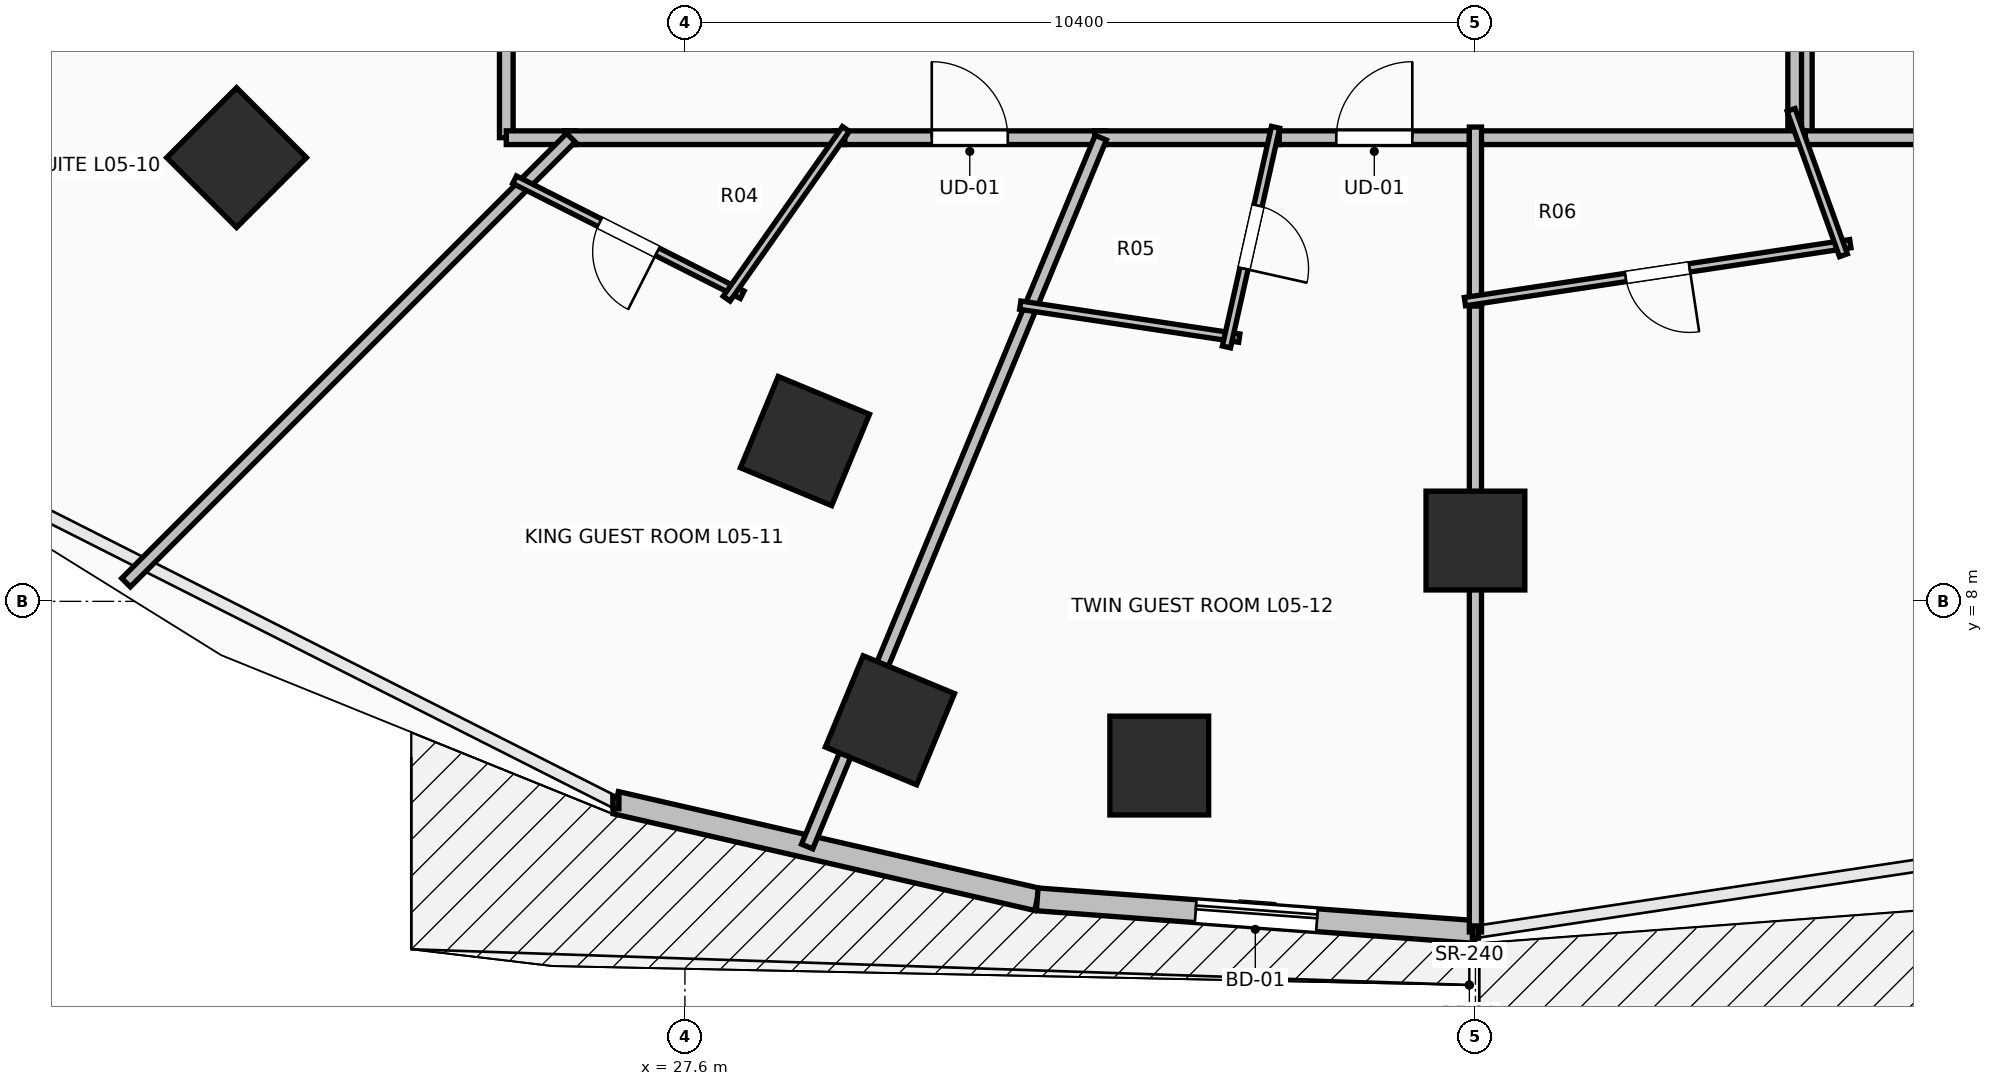
"""IFC4 building model, lengths in metres.
Left out: names, types, materials, properties, quantities, classifications, styles, units other than length and angle.
Written with IfcOpenShell. Run it as: python <this file> out.ifc"""

import sys

from ifc_helpers import new_model, si_unit, direction, frame, frame_2d, origin, origin_2d, place, context, subcontext, project, spatial, rectangle, extrude, element, fill, save


model = new_model("IFC4")
c1 = context("Model", 3, precision=1e-05, world=origin(), true_north=direction((0.0, 1.0)))
c2 = subcontext(c1, "Body", "Model", "MODEL_VIEW")
j1 = project(units=[si_unit("LENGTHUNIT", "METRE"), si_unit("PLANEANGLEUNIT", "RADIAN")], contexts=[c1])
p1 = place(None, origin())
s1 = spatial("IfcSite", under=j1, at=p1, CompositionType="ELEMENT")
p2 = place(p1, origin())
s2 = spatial("IfcBuilding", under=s1, at=p2, CompositionType="ELEMENT")
p3 = place(p2, frame((0.0, 0.0, 24.0)))
s3 = spatial("IfcBuildingStorey", under=s2, at=p3, CompositionType="ELEMENT", Elevation=24.0)
for number, where, z_axis, x_axis in (
    (1, (21.701, 13.838, 0.0), (0.0, 0.0, 1.0), (-0.707, -0.707, 0.0)),
    (2, (29.179, 10.109, 0.0), (0.0, 0.0, 1.0), (-0.383, -0.924, 0.0)),
    (3, (38.0, 8.8, 0.0), (0.0, 0.0, 1.0), (0.0, -1.0, 0.0)),
    (4, (30.297, 6.435, 0.0), (0.0, 0.0, 1.0), (-0.383, -0.924, 0.0)),
    (5, (33.84, 5.84, 0.0), (0.0, 0.0, 1.0), (0.0, -1.0, 0.0)),
):
    element("IfcColumn", number, at=place(p3, frame(where, z_axis=z_axis, x_axis=x_axis)), inside=s3, PredefinedType="COLUMN", context=c2, shape_type="SweptSolid", body=[
        extrude(rectangle(XDim=1.3, YDim=1.3, at=origin_2d()), origin(), (0.0, 0.0, 1.0), 3.5),
    ])
p4 = place(p3, frame((26.692, 5.351, 0.0), z_axis=(0.0, 0.0, 1.0), x_axis=(0.974671141646, -0.223642942305, 0.0)))
e6 = element("IfcWall", 6, at=p4, inside=s3, PredefinedType="STANDARD", context=c2, shape_type="SweptSolid", body=[
    extrude(rectangle(XDim=5.688, YDim=0.3, at=frame_2d((2.844, 0.0))), origin(), (0.0, 0.0, 1.0), 3.24),
])
p5 = place(p3, frame((32.235, 4.079, 0.0), z_axis=(0.0, 0.0, 1.0), x_axis=(0.99723690101, -0.074287032943, 0.0)))
e7 = element("IfcWall", 7, at=p5, inside=s3, PredefinedType="STANDARD", context=c2, shape_type="SweptSolid", body=[
    extrude(rectangle(XDim=5.781, YDim=0.3, at=frame_2d((2.89, 0.0))), origin(), (0.0, 0.0, 1.0), 3.24),
])
p6 = place(p5, frame((2.09, 0.0, 0.0)))
e8 = element("IfcOpeningElement", 8, at=p6, cuts=e7, PredefinedType="OPENING", context=c2, shape_type="SweptSolid", body=[
    extrude(rectangle(XDim=1.6, YDim=2.3, at=frame_2d((0.8, 1.15))), frame((0.0, 0.165, 0.0), z_axis=(0.0, -1.0, 0.0), x_axis=(1.0, 0.0, 0.0)), (0.0, 0.0, 1.0), 0.33),
])
p7 = place(p3, frame((25.25, 17.969, 0.0), z_axis=(0.0, 0.0, 1.0), x_axis=(0.0, -1.0, 0.0)))
e9 = element("IfcWall", 9, at=p7, inside=s3, PredefinedType="PARTITIONING", context=c2, shape_type="SweptSolid", body=[
    extrude(rectangle(XDim=3.869, YDim=0.18, at=frame_2d((1.935, 0.0))), origin(), (0.0, 0.0, 1.0), 2.432),
])
p8 = place(p7, frame((1.409, 0.0, 0.0)))
e10 = element("IfcOpeningElement", 10, at=p8, cuts=e9, PredefinedType="OPENING", context=c2, shape_type="SweptSolid", body=[
    extrude(rectangle(XDim=1.05, YDim=2.2, at=frame_2d((0.525, 1.1))), frame((0.0, 0.105, 0.0), z_axis=(0.0, -1.0, 0.0), x_axis=(1.0, 0.0, 0.0)), (0.0, 0.0, 1.0), 0.21),
])
p9 = place(p3, frame((25.25, 14.1, 0.0), z_axis=(0.0, 0.0, 1.0), x_axis=(1.0, 0.0, 0.0)))
e11 = element("IfcWall", 11, at=p9, inside=s3, PredefinedType="PARTITIONING", context=c2, shape_type="SweptSolid", body=[
    extrude(rectangle(XDim=0.91, YDim=0.18, at=frame_2d((0.455, 0.0))), origin(), (0.0, 0.0, 1.0), 3.24),
])
p10 = place(p3, frame((29.564, 14.1, 0.0), z_axis=(0.0, 0.0, 1.0), x_axis=(1.0, 0.0, 0.0)))
e12 = element("IfcWall", 12, at=p10, inside=s3, PredefinedType="PARTITIONING", context=c2, shape_type="SweptSolid", body=[
    extrude(rectangle(XDim=3.567, YDim=0.18, at=frame_2d((1.784, 0.0))), origin(), (0.0, 0.0, 1.0), 3.24),
])
p11 = place(p10, frame((1.283, 0.0, 0.0)))
e13 = element("IfcOpeningElement", 13, at=p11, cuts=e12, PredefinedType="OPENING", context=c2, shape_type="SweptSolid", body=[
    extrude(rectangle(XDim=1.0, YDim=2.15, at=frame_2d((0.5, 1.075))), frame((0.0, 0.105, 0.0), z_axis=(0.0, -1.0, 0.0), x_axis=(1.0, 0.0, 0.0)), (0.0, 0.0, 1.0), 0.21),
])
p12 = place(p3, frame((26.02, 14.1, 0.0), z_axis=(0.0, 0.0, 1.0), x_axis=(1.0, 0.0, 0.0)))
e14 = element("IfcWall", 14, at=p12, inside=s3, PredefinedType="PARTITIONING", context=c2, shape_type="SweptSolid", body=[
    extrude(rectangle(XDim=3.684, YDim=0.18, at=frame_2d((1.842, 0.0))), origin(), (0.0, 0.0, 1.0), 2.432),
])
p13 = place(p3, frame((35.279, 14.1, 0.0), z_axis=(0.0, 0.0, 1.0), x_axis=(1.0, 0.0, 0.0)))
e15 = element("IfcWall", 15, at=p13, inside=s3, PredefinedType="PARTITIONING", context=c2, shape_type="SweptSolid", body=[
    extrude(rectangle(XDim=2.781, YDim=0.18, at=frame_2d((1.391, 0.0))), origin(), (0.0, 0.0, 1.0), 3.24),
])
p14 = place(p13, frame((0.89, 0.0, 0.0)))
e16 = element("IfcOpeningElement", 16, at=p14, cuts=e15, PredefinedType="OPENING", context=c2, shape_type="SweptSolid", body=[
    extrude(rectangle(XDim=1.0, YDim=2.15, at=frame_2d((0.5, 1.075))), frame((0.0, 0.105, 0.0), z_axis=(0.0, -1.0, 0.0), x_axis=(1.0, 0.0, 0.0)), (0.0, 0.0, 1.0), 0.21),
])
p15 = place(p3, frame((32.991, 14.1, 0.0), z_axis=(0.0, 0.0, 1.0), x_axis=(1.0, 0.0, 0.0)))
e17 = element("IfcWall", 17, at=p15, inside=s3, PredefinedType="PARTITIONING", context=c2, shape_type="SweptSolid", body=[
    extrude(rectangle(XDim=2.428, YDim=0.18, at=frame_2d((1.214, 0.0))), origin(), (0.0, 0.0, 1.0), 3.24),
])
p16 = place(p3, frame((42.34, 16.24, 0.0), z_axis=(0.0, 0.0, 1.0), x_axis=(0.0, -1.0, 0.0)))
e18 = element("IfcWall", 18, at=p16, inside=s3, PredefinedType="PARTITIONING", context=c2, shape_type="SweptSolid", body=[
    extrude(rectangle(XDim=2.14, YDim=0.18, at=frame_2d((1.07, 0.0))), origin(), (0.0, 0.0, 1.0), 3.24),
])
p17 = place(p3, frame((42.34, 14.1, 0.0), z_axis=(0.0, 0.0, 1.0), x_axis=(1.0, 0.0, 0.0)))
e19 = element("IfcWall", 19, at=p17, inside=s3, PredefinedType="PARTITIONING", context=c2, shape_type="SweptSolid", body=[
    extrude(rectangle(XDim=7.645, YDim=0.18, at=frame_2d((3.823, 0.0))), origin(), (0.0, 0.0, 1.0), 2.432),
])
p18 = place(p17, frame((3.298, 0.0, 0.0)))
e20 = element("IfcOpeningElement", 20, at=p18, cuts=e19, PredefinedType="OPENING", context=c2, shape_type="SweptSolid", body=[
    extrude(rectangle(XDim=1.05, YDim=2.2, at=frame_2d((0.525, 1.1))), frame((0.0, 0.105, 0.0), z_axis=(0.0, -1.0, 0.0), x_axis=(1.0, 0.0, 0.0)), (0.0, 0.0, 1.0), 0.21),
])
p19 = place(p3, frame((42.2, 14.157, 0.0), z_axis=(0.0, 0.0, 1.0), x_axis=(0.0, 1.0, 0.0)))
e21 = element("IfcWall", 21, at=p19, inside=s3, PredefinedType="PARTITIONING", context=c2, shape_type="SweptSolid", body=[
    extrude(rectangle(XDim=2.083, YDim=0.18, at=frame_2d((1.042, 0.0))), origin(), (0.0, 0.0, 1.0), 3.24),
])
p20 = place(p3, frame((37.92, 14.1, 0.0), z_axis=(0.0, 0.0, 1.0), x_axis=(1.0, 0.0, 0.0)))
e22 = element("IfcWall", 22, at=p20, inside=s3, PredefinedType="PARTITIONING", context=c2, shape_type="SweptSolid", body=[
    extrude(rectangle(XDim=4.42, YDim=0.18, at=frame_2d((2.21, 0.0))), origin(), (0.0, 0.0, 1.0), 3.24),
])
p21 = place(p3, frame((20.247, 8.247, 0.0), z_axis=(0.0, 0.0, 1.0), x_axis=(0.707106781187, 0.707106781187, 0.0)))
e23 = element("IfcWall", 23, at=p21, inside=s3, PredefinedType="PARTITIONING", context=c2, shape_type="SweptSolid", body=[
    extrude(rectangle(XDim=8.277, YDim=0.16, at=frame_2d((4.139, 0.0))), origin(), (0.0, 0.0, 1.0), 2.624),
])
p22 = place(p3, frame((28.354, 12.034, 0.0), z_axis=(0.0, 0.0, 1.0), x_axis=(-0.892556909034, 0.450934767052, 0.0)))
e24 = element("IfcWall", 24, at=p22, inside=s3, PredefinedType="PARTITIONING", context=c2, shape_type="SweptSolid", body=[
    extrude(rectangle(XDim=3.356, YDim=0.11, at=frame_2d((1.678, 0.0))), origin(), (0.0, 0.0, 1.0), 2.432),
])
p23 = place(p22, frame((1.253, 0.0, 0.0)))
e25 = element("IfcOpeningElement", 25, at=p23, cuts=e24, PredefinedType="OPENING", context=c2, shape_type="SweptSolid", body=[
    extrude(rectangle(XDim=0.85, YDim=2.1, at=frame_2d((0.425, 1.05))), frame((0.0, 0.07, 0.0), z_axis=(0.0, -1.0, 0.0), x_axis=(1.0, 0.0, 0.0)), (0.0, 0.0, 1.0), 0.14),
])
p24 = place(p3, frame((29.718, 14.215, 0.0), z_axis=(0.0, 0.0, 1.0), x_axis=(-0.575076641985, -0.81809953908, 0.0)))
e26 = element("IfcWall", 26, at=p24, inside=s3, PredefinedType="PARTITIONING", context=c2, shape_type="SweptSolid", body=[
    extrude(rectangle(XDim=2.729, YDim=0.11, at=frame_2d((1.364, 0.0))), origin(), (0.0, 0.0, 1.0), 2.432),
])
p25 = place(p3, frame((29.208, 4.775, 0.0), z_axis=(0.0, 0.0, 1.0), x_axis=(0.382718503749, 0.923865004689, 0.0)))
e27 = element("IfcWall", 27, at=p25, inside=s3, PredefinedType="PARTITIONING", context=c2, shape_type="SweptSolid", body=[
    extrude(rectangle(XDim=10.094, YDim=0.16, at=frame_2d((5.047, 0.0))), origin(), (0.0, 0.0, 1.0), 2.432),
])
p26 = place(p3, frame((34.893, 11.463, 0.0), z_axis=(0.0, 0.0, 1.0), x_axis=(-0.988868035357, 0.148795190273, 0.0)))
e28 = element("IfcWall", 28, at=p26, inside=s3, PredefinedType="PARTITIONING", context=c2, shape_type="SweptSolid", body=[
    extrude(rectangle(XDim=2.914, YDim=0.11, at=frame_2d((1.457, 0.0))), origin(), (0.0, 0.0, 1.0), 3.24),
])
p27 = place(p3, frame((35.371, 14.237, 0.0), z_axis=(0.0, 0.0, 1.0), x_axis=(-0.218283637967, -0.975885368983, 0.0)))
e29 = element("IfcWall", 29, at=p27, inside=s3, PredefinedType="PARTITIONING", context=c2, shape_type="SweptSolid", body=[
    extrude(rectangle(XDim=2.96, YDim=0.11, at=frame_2d((1.48, 0.0))), origin(), (0.0, 0.0, 1.0), 2.922),
])
p28 = place(p27, frame((1.055, 0.0, 0.0)))
e30 = element("IfcOpeningElement", 30, at=p28, cuts=e29, PredefinedType="OPENING", context=c2, shape_type="SweptSolid", body=[
    extrude(rectangle(XDim=0.85, YDim=2.1, at=frame_2d((0.425, 1.05))), frame((0.0, 0.07, 0.0), z_axis=(0.0, -1.0, 0.0), x_axis=(1.0, 0.0, 0.0)), (0.0, 0.0, 1.0), 0.14),
])
p29 = place(p3, frame((38.0, 3.65, 0.0), z_axis=(0.0, 0.0, 1.0), x_axis=(0.0, 1.0, 0.0)))
e31 = element("IfcWall", 31, at=p29, inside=s3, PredefinedType="PARTITIONING", context=c2, shape_type="SweptSolid", body=[
    extrude(rectangle(XDim=8.375, YDim=0.16, at=frame_2d((4.188, 0.0))), origin(), (0.0, 0.0, 1.0), 2.432),
])
p30 = place(p3, frame((38.0, 11.885, 0.0), z_axis=(0.0, 0.0, 1.0), x_axis=(0.0, 1.0, 0.0)))
e32 = element("IfcWall", 32, at=p30, inside=s3, PredefinedType="PARTITIONING", context=c2, shape_type="SweptSolid", body=[
    extrude(rectangle(XDim=2.355, YDim=0.16, at=frame_2d((1.177, 0.0))), origin(), (0.0, 0.0, 1.0), 2.922),
])
p31 = place(p3, frame((42.932, 12.706, 0.0), z_axis=(0.0, 0.0, 1.0), x_axis=(-0.988876905643, -0.148736227888, 0.0)))
e33 = element("IfcWall", 33, at=p31, inside=s3, PredefinedType="PARTITIONING", context=c2, shape_type="SweptSolid", body=[
    extrude(rectangle(XDim=5.128, YDim=0.11, at=frame_2d((2.564, 0.0))), origin(), (0.0, 0.0, 1.0), 3.24),
])
p32 = place(p31, frame((2.139, 0.0, 0.0)))
e34 = element("IfcOpeningElement", 34, at=p32, cuts=e33, PredefinedType="OPENING", context=c2, shape_type="SweptSolid", body=[
    extrude(rectangle(XDim=0.85, YDim=2.1, at=frame_2d((0.425, 1.05))), frame((0.0, 0.07, 0.0), z_axis=(0.0, -1.0, 0.0), x_axis=(1.0, 0.0, 0.0)), (0.0, 0.0, 1.0), 0.14),
])
p33 = place(p3, frame((42.153, 14.466, 0.0), z_axis=(0.0, 0.0, 1.0), x_axis=(0.338800270412, -0.940858319179, 0.0)))
e35 = element("IfcWall", 35, at=p33, inside=s3, PredefinedType="PARTITIONING", context=c2, shape_type="SweptSolid", body=[
    extrude(rectangle(XDim=2.033, YDim=0.11, at=frame_2d((1.016, 0.0))), origin(), (0.0, 0.0, 1.0), 2.432),
])
p34 = place(p6, origin())
e36 = element("IfcDoor", 36, at=p34, inside=s3, OperationType="SLIDING_TO_LEFT", PredefinedType="DOOR", context=c2, shape_type="SweptSolid", body=[
    extrude(rectangle(XDim=1.6, YDim=2.3, at=frame_2d((0.8, 1.15))), frame((0.0, 0.025, 0.0), z_axis=(0.0, -1.0, 0.0), x_axis=(1.0, 0.0, 0.0)), (0.0, 0.0, 1.0), 0.05),
])
fill(e8, e36)
p35 = place(p11, origin())
e37 = element("IfcDoor", 37, at=p35, inside=s3, OperationType="SINGLE_SWING_LEFT", PredefinedType="DOOR", context=c2, shape_type="SweptSolid", body=[
    extrude(rectangle(XDim=1.0, YDim=2.15, at=frame_2d((0.5, 1.075))), frame((0.0, 0.025, 0.0), z_axis=(0.0, -1.0, 0.0), x_axis=(1.0, 0.0, 0.0)), (0.0, 0.0, 1.0), 0.05),
])
fill(e13, e37)
p36 = place(p14, origin())
e38 = element("IfcDoor", 38, at=p36, inside=s3, OperationType="SINGLE_SWING_RIGHT", PredefinedType="DOOR", context=c2, shape_type="SweptSolid", body=[
    extrude(rectangle(XDim=1.0, YDim=2.15, at=frame_2d((0.5, 1.075))), frame((0.0, 0.025, 0.0), z_axis=(0.0, -1.0, 0.0), x_axis=(1.0, 0.0, 0.0)), (0.0, 0.0, 1.0), 0.05),
])
fill(e16, e38)
p37 = place(p23, origin())
e39 = element("IfcDoor", 39, at=p37, inside=s3, OperationType="SINGLE_SWING_LEFT", PredefinedType="DOOR", context=c2, shape_type="SweptSolid", body=[
    extrude(rectangle(XDim=0.85, YDim=2.1, at=frame_2d((0.425, 1.05))), frame((0.0, 0.025, 0.0), z_axis=(0.0, -1.0, 0.0), x_axis=(1.0, 0.0, 0.0)), (0.0, 0.0, 1.0), 0.05),
])
fill(e25, e39)
p38 = place(p28, origin())
e40 = element("IfcDoor", 40, at=p38, inside=s3, OperationType="SINGLE_SWING_RIGHT", PredefinedType="DOOR", context=c2, shape_type="SweptSolid", body=[
    extrude(rectangle(XDim=0.85, YDim=2.1, at=frame_2d((0.425, 1.05))), frame((0.0, 0.025, 0.0), z_axis=(0.0, -1.0, 0.0), x_axis=(1.0, 0.0, 0.0)), (0.0, 0.0, 1.0), 0.05),
])
fill(e30, e40)
p39 = place(p32, origin())
e41 = element("IfcDoor", 41, at=p39, inside=s3, OperationType="SINGLE_SWING_LEFT", PredefinedType="DOOR", context=c2, shape_type="SweptSolid", body=[
    extrude(rectangle(XDim=0.85, YDim=2.1, at=frame_2d((0.425, 1.05))), frame((0.0, 0.025, 0.0), z_axis=(0.0, -1.0, 0.0), x_axis=(1.0, 0.0, 0.0)), (0.0, 0.0, 1.0), 0.05),
])
fill(e34, e41)
save(model, sys.argv[1])
